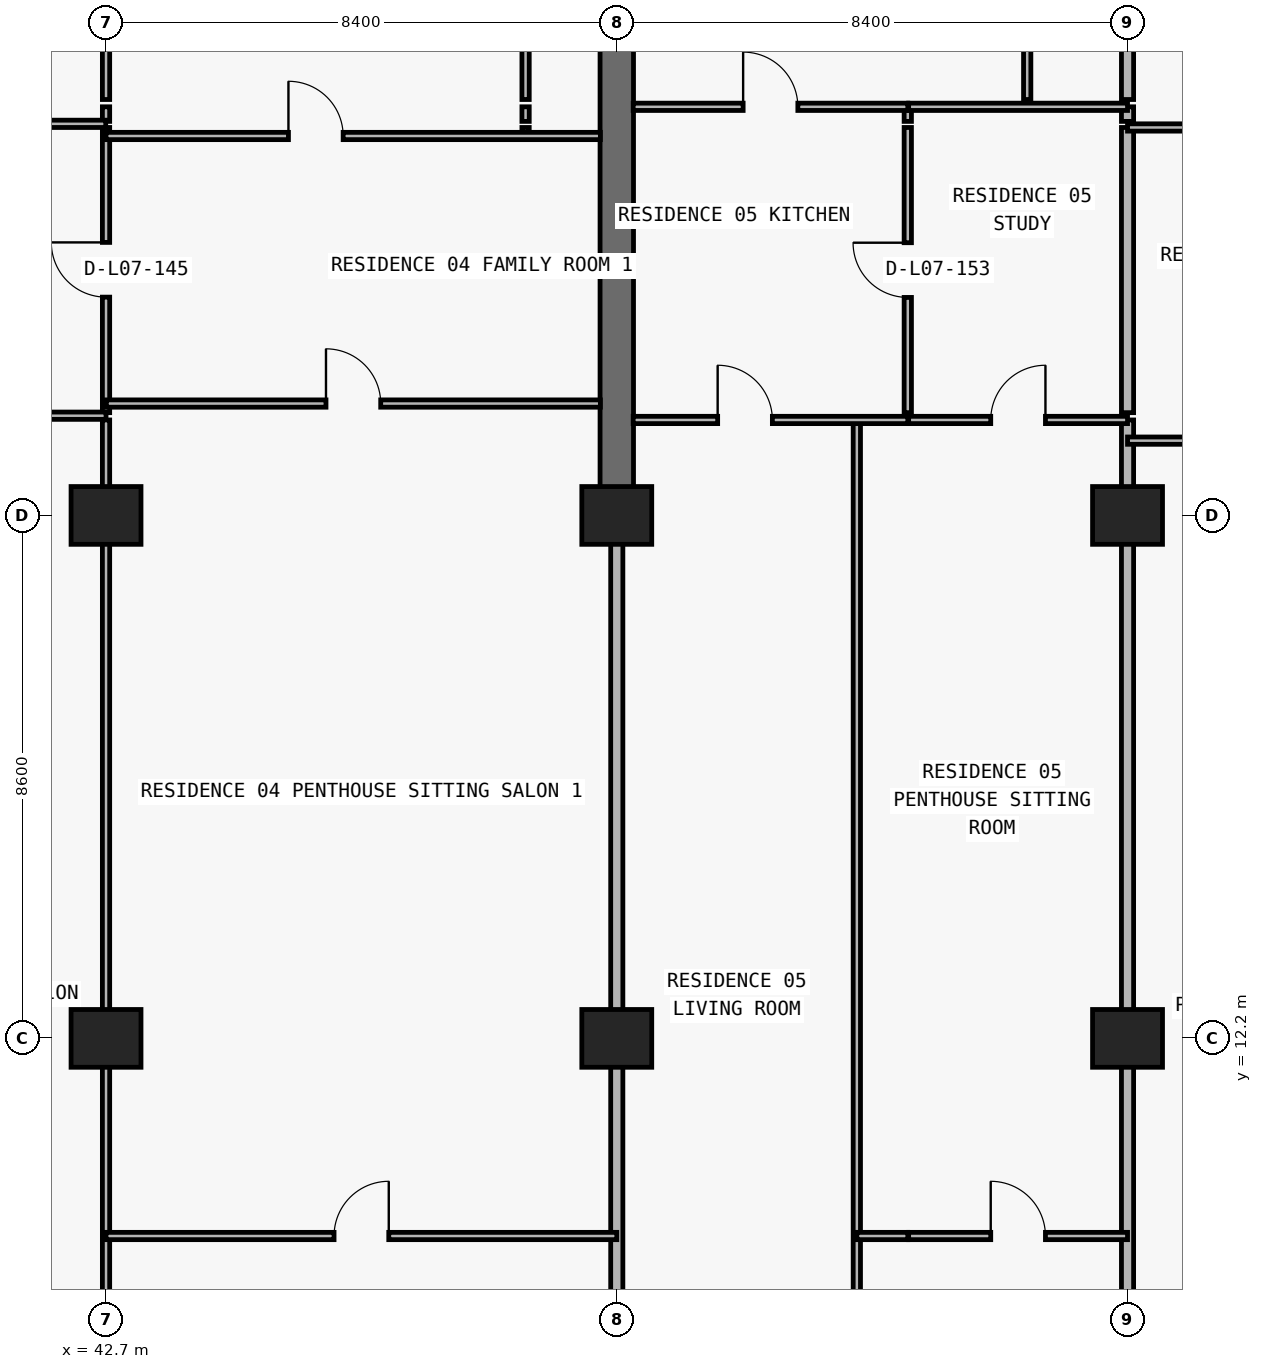
"""IFC4 building model, lengths in metres.
Left out: names, types, materials, properties, quantities, classifications, styles, units other than length and angle.
Written with IfcOpenShell. Run it as: python <this file> out.ifc"""

import sys

from ifc_helpers import new_model, si_unit, direction, frame, frame_2d, origin, origin_2d, place, context, subcontext, project, spatial, rectangle, extrude, element, fill, save


model = new_model("IFC4")
c1 = context("Model", 3, precision=1e-05, world=origin(), true_north=direction((0.0, 1.0)))
c2 = subcontext(c1, "Body", "Model", "MODEL_VIEW")
j1 = project(units=[si_unit("LENGTHUNIT", "METRE"), si_unit("PLANEANGLEUNIT", "RADIAN")], contexts=[c1])
p1 = place(None, origin())
s1 = spatial("IfcSite", under=j1, at=p1, CompositionType="ELEMENT")
p2 = place(p1, origin())
s2 = spatial("IfcBuilding", under=s1, at=p2, CompositionType="ELEMENT")
p3 = place(p2, frame((0.0, 0.0, 33.3)))
s3 = spatial("IfcBuildingStorey", under=s2, at=p3, CompositionType="ELEMENT", Elevation=33.3)
for number, where, z_axis, x_axis in (
    (1, (42.7, 12.2, 0.0), (0.0, 0.0, 1.0), (1.0, 0.0, 0.0)),
    (2, (51.1, 12.2, 0.0), (0.0, 0.0, 1.0), (1.0, 0.0, 0.0)),
    (3, (59.5, 12.2, 0.0), (0.0, 0.0, 1.0), (1.0, 0.0, 0.0)),
    (4, (42.7, 20.8, 0.0), (0.0, 0.0, 1.0), (1.0, 0.0, 0.0)),
    (5, (51.1, 20.8, 0.0), (0.0, 0.0, 1.0), (1.0, 0.0, 0.0)),
    (6, (59.5, 20.8, 0.0), (0.0, 0.0, 1.0), (1.0, 0.0, 0.0)),
):
    element("IfcColumn", number, at=place(p3, frame(where, z_axis=z_axis, x_axis=x_axis)), inside=s3, PredefinedType="COLUMN", context=c2, shape_type="SweptSolid", body=[
        extrude(rectangle(XDim=1.15, YDim=0.95, at=origin_2d()), origin(), (0.0, 0.0, 1.0), 3.05),
    ])
p4 = place(p3, frame((51.1, 20.8, 0.0), z_axis=(0.0, 0.0, 1.0), x_axis=(0.0, 1.0, 0.0)))
e7 = element("IfcWall", 7, at=p4, inside=s3, PredefinedType="SHEAR", context=c2, shape_type="SweptSolid", body=[
    extrude(rectangle(XDim=8.6, YDim=0.55, at=frame_2d((4.3, 0.0))), origin(), (0.0, 0.0, 1.0), 3.05),
])
p5 = place(p3, frame((42.7, 6.24, 0.0), z_axis=(0.0, 0.0, 1.0), x_axis=(0.0, 1.0, 0.0)))
e8 = element("IfcWall", 8, at=p5, inside=s3, PredefinedType="PARTITIONING", context=c2, shape_type="SweptSolid", body=[
    extrude(rectangle(XDim=16.13, YDim=0.12, at=frame_2d((8.065, 0.0))), origin(), (0.0, 0.0, 1.0), 2.11),
])
p6 = place(p3, frame((42.7, 22.49, 0.0), z_axis=(0.0, 0.0, 1.0), x_axis=(0.0, 1.0, 0.0)))
e9 = element("IfcWall", 9, at=p6, inside=s3, PredefinedType="PARTITIONING", context=c2, shape_type="SweptSolid", body=[
    extrude(rectangle(XDim=4.69, YDim=0.12, at=frame_2d((2.345, 0.0))), origin(), (0.0, 0.0, 1.0), 2.11),
])
p7 = place(p6, frame((1.9, 0.0, 0.0)))
e10 = element("IfcOpeningElement", 10, at=p7, cuts=e9, PredefinedType="OPENING", context=c2, shape_type="SweptSolid", body=[
    extrude(rectangle(XDim=0.9, YDim=2.06, at=frame_2d((0.45, 1.03))), frame((0.0, 0.07, 0.0), z_axis=(0.0, -1.0, 0.0), x_axis=(1.0, 0.0, 0.0)), (0.0, 0.0, 1.0), 0.14),
])
p8 = place(p3, frame((42.7, 27.28, 0.0), z_axis=(0.0, 0.0, 1.0), x_axis=(0.0, 1.0, 0.0)))
e11 = element("IfcWall", 11, at=p8, inside=s3, PredefinedType="PARTITIONING", context=c2, shape_type="SweptSolid", body=[
    extrude(rectangle(XDim=0.24, YDim=0.12, at=frame_2d((0.12, 0.0))), origin(), (0.0, 0.0, 1.0), 2.11),
])
p9 = place(p3, frame((42.7, 27.64, 0.0), z_axis=(0.0, 0.0, 1.0), x_axis=(0.0, 1.0, 0.0)))
e12 = element("IfcWall", 12, at=p9, inside=s3, PredefinedType="PARTITIONING", context=c2, shape_type="SweptSolid", body=[
    extrude(rectangle(XDim=6.86, YDim=0.12, at=frame_2d((3.43, 0.0))), origin(), (0.0, 0.0, 1.0), 2.11),
])
p10 = place(p3, frame((49.6, 27.04, 0.0), z_axis=(0.0, 0.0, 1.0), x_axis=(0.0, 1.0, 0.0)))
e13 = element("IfcWall", 13, at=p10, inside=s3, PredefinedType="PARTITIONING", context=c2, shape_type="SweptSolid", body=[
    extrude(rectangle(XDim=0.14, YDim=0.12, at=frame_2d((0.07, 0.0))), origin(), (0.0, 0.0, 1.0), 3.05),
])
p11 = place(p3, frame((49.6, 27.28, 0.0), z_axis=(0.0, 0.0, 1.0), x_axis=(0.0, 1.0, 0.0)))
e14 = element("IfcWall", 14, at=p11, inside=s3, PredefinedType="PARTITIONING", context=c2, shape_type="SweptSolid", body=[
    extrude(rectangle(XDim=0.24, YDim=0.12, at=frame_2d((0.12, 0.0))), origin(), (0.0, 0.0, 1.0), 3.05),
])
p12 = place(p3, frame((49.6, 27.64, 0.0), z_axis=(0.0, 0.0, 1.0), x_axis=(0.0, 1.0, 0.0)))
e15 = element("IfcWall", 15, at=p12, inside=s3, PredefinedType="PARTITIONING", context=c2, shape_type="SweptSolid", body=[
    extrude(rectangle(XDim=6.86, YDim=0.12, at=frame_2d((3.43, 0.0))), origin(), (0.0, 0.0, 1.0), 3.05),
])
p13 = place(p12, frame((3.005, 0.0, 0.0)))
e16 = element("IfcOpeningElement", 16, at=p13, cuts=e15, PredefinedType="OPENING", context=c2, shape_type="SweptSolid", body=[
    extrude(rectangle(XDim=0.85, YDim=2.1, at=frame_2d((0.425, 1.05))), frame((0.0, 0.07, 0.0), z_axis=(0.0, -1.0, 0.0), x_axis=(1.0, 0.0, 0.0)), (0.0, 0.0, 1.0), 0.14),
])
p14 = place(p3, frame((51.1, 6.24, 0.0), z_axis=(0.0, 0.0, 1.0), x_axis=(0.0, 1.0, 0.0)))
e17 = element("IfcWall", 17, at=p14, inside=s3, PredefinedType="PARTITIONING", context=c2, shape_type="SweptSolid", body=[
    extrude(rectangle(XDim=14.555, YDim=0.2, at=frame_2d((7.277, 0.0))), origin(), (0.0, 0.0, 1.0), 2.11),
])
p15 = place(p3, frame((55.048, 6.24, 0.0), z_axis=(0.0, 0.0, 1.0), x_axis=(0.0, 1.0, 0.0)))
e18 = element("IfcWall", 18, at=p15, inside=s3, PredefinedType="PARTITIONING", context=c2, shape_type="SweptSolid", body=[
    extrude(rectangle(XDim=16.13, YDim=0.12, at=frame_2d((8.065, 0.0))), origin(), (0.0, 0.0, 1.0), 3.05),
])
p16 = place(p3, frame((55.886, 22.49, 0.0), z_axis=(0.0, 0.0, 1.0), x_axis=(0.0, 1.0, 0.0)))
e19 = element("IfcWall", 19, at=p16, inside=s3, PredefinedType="PARTITIONING", context=c2, shape_type="SweptSolid", body=[
    extrude(rectangle(XDim=4.69, YDim=0.12, at=frame_2d((2.345, 0.0))), origin(), (0.0, 0.0, 1.0), 3.05),
])
p17 = place(p16, frame((1.895, 0.0, 0.0)))
e20 = element("IfcOpeningElement", 20, at=p17, cuts=e19, PredefinedType="OPENING", context=c2, shape_type="SweptSolid", body=[
    extrude(rectangle(XDim=0.9, YDim=2.15, at=frame_2d((0.45, 1.075))), frame((0.0, 0.07, 0.0), z_axis=(0.0, -1.0, 0.0), x_axis=(1.0, 0.0, 0.0)), (0.0, 0.0, 1.0), 0.14),
])
p18 = place(p3, frame((55.886, 27.28, 0.0), z_axis=(0.0, 0.0, 1.0), x_axis=(0.0, 1.0, 0.0)))
e21 = element("IfcWall", 21, at=p18, inside=s3, PredefinedType="PARTITIONING", context=c2, shape_type="SweptSolid", body=[
    extrude(rectangle(XDim=0.24, YDim=0.12, at=frame_2d((0.12, 0.0))), origin(), (0.0, 0.0, 1.0), 3.05),
])
p19 = place(p3, frame((57.85, 27.64, 0.0), z_axis=(0.0, 0.0, 1.0), x_axis=(0.0, 1.0, 0.0)))
e22 = element("IfcWall", 22, at=p19, inside=s3, PredefinedType="PARTITIONING", context=c2, shape_type="SweptSolid", body=[
    extrude(rectangle(XDim=6.86, YDim=0.12, at=frame_2d((3.43, 0.0))), origin(), (0.0, 0.0, 1.0), 3.05),
])
p20 = place(p19, frame((3.005, 0.0, 0.0)))
e23 = element("IfcOpeningElement", 23, at=p20, cuts=e22, PredefinedType="OPENING", context=c2, shape_type="SweptSolid", body=[
    extrude(rectangle(XDim=0.85, YDim=2.1, at=frame_2d((0.425, 1.05))), frame((0.0, 0.07, 0.0), z_axis=(0.0, -1.0, 0.0), x_axis=(1.0, 0.0, 0.0)), (0.0, 0.0, 1.0), 0.14),
])
p21 = place(p3, frame((59.5, 6.24, 0.0), z_axis=(0.0, 0.0, 1.0), x_axis=(0.0, 1.0, 0.0)))
e24 = element("IfcWall", 24, at=p21, inside=s3, PredefinedType="PARTITIONING", context=c2, shape_type="SweptSolid", body=[
    extrude(rectangle(XDim=16.13, YDim=0.2, at=frame_2d((8.065, 0.0))), origin(), (0.0, 0.0, 1.0), 2.11),
])
p22 = place(p3, frame((59.5, 22.49, 0.0), z_axis=(0.0, 0.0, 1.0), x_axis=(0.0, 1.0, 0.0)))
e25 = element("IfcWall", 25, at=p22, inside=s3, PredefinedType="PARTITIONING", context=c2, shape_type="SweptSolid", body=[
    extrude(rectangle(XDim=4.69, YDim=0.2, at=frame_2d((2.345, 0.0))), origin(), (0.0, 0.0, 1.0), 2.11),
])
p23 = place(p3, frame((59.5, 27.28, 0.0), z_axis=(0.0, 0.0, 1.0), x_axis=(0.0, 1.0, 0.0)))
e26 = element("IfcWall", 26, at=p23, inside=s3, PredefinedType="PARTITIONING", context=c2, shape_type="SweptSolid", body=[
    extrude(rectangle(XDim=0.24, YDim=0.2, at=frame_2d((0.12, 0.0))), origin(), (0.0, 0.0, 1.0), 2.11),
])
p24 = place(p3, frame((59.5, 27.64, 0.0), z_axis=(0.0, 0.0, 1.0), x_axis=(0.0, 1.0, 0.0)))
e27 = element("IfcWall", 27, at=p24, inside=s3, PredefinedType="PARTITIONING", context=c2, shape_type="SweptSolid", body=[
    extrude(rectangle(XDim=6.86, YDim=0.2, at=frame_2d((3.43, 0.0))), origin(), (0.0, 0.0, 1.0), 2.11),
])
p25 = place(p3, frame((42.7, 8.95, 0.0), z_axis=(0.0, 0.0, 1.0), x_axis=(1.0, 0.0, 0.0)))
e28 = element("IfcWall", 28, at=p25, inside=s3, PredefinedType="PARTITIONING", context=c2, shape_type="SweptSolid", body=[
    extrude(rectangle(XDim=8.4, YDim=0.12, at=frame_2d((4.2, 0.0))), origin(), (0.0, 0.0, 1.0), 3.05),
])
p26 = place(p25, frame((3.75, 0.0, 0.0)))
e29 = element("IfcOpeningElement", 29, at=p26, cuts=e28, PredefinedType="OPENING", context=c2, shape_type="SweptSolid", body=[
    extrude(rectangle(XDim=0.9, YDim=2.15, at=frame_2d((0.45, 1.075))), frame((0.0, 0.07, 0.0), z_axis=(0.0, -1.0, 0.0), x_axis=(1.0, 0.0, 0.0)), (0.0, 0.0, 1.0), 0.14),
])
p27 = place(p3, frame((55.048, 8.95, 0.0), z_axis=(0.0, 0.0, 1.0), x_axis=(1.0, 0.0, 0.0)))
e30 = element("IfcWall", 30, at=p27, inside=s3, PredefinedType="PARTITIONING", context=c2, shape_type="SweptSolid", body=[
    extrude(rectangle(XDim=0.838, YDim=0.12, at=frame_2d((0.419, 0.0))), origin(), (0.0, 0.0, 1.0), 3.05),
])
p28 = place(p3, frame((55.9, 8.95, 0.0), z_axis=(0.0, 0.0, 1.0), x_axis=(1.0, 0.0, 0.0)))
e31 = element("IfcWall", 31, at=p28, inside=s3, PredefinedType="PARTITIONING", context=c2, shape_type="SweptSolid", body=[
    extrude(rectangle(XDim=3.6, YDim=0.12, at=frame_2d((1.8, 0.0))), origin(), (0.0, 0.0, 1.0), 3.05),
])
p29 = place(p28, frame((1.35, 0.0, 0.0)))
e32 = element("IfcOpeningElement", 32, at=p29, cuts=e31, PredefinedType="OPENING", context=c2, shape_type="SweptSolid", body=[
    extrude(rectangle(XDim=0.9, YDim=2.15, at=frame_2d((0.45, 1.075))), frame((0.0, 0.07, 0.0), z_axis=(0.0, -1.0, 0.0), x_axis=(1.0, 0.0, 0.0)), (0.0, 0.0, 1.0), 0.14),
])
p30 = place(p3, frame((59.5, 22.03, 0.0), z_axis=(0.0, 0.0, 1.0), x_axis=(1.0, 0.0, 0.0)))
e33 = element("IfcWall", 33, at=p30, inside=s3, PredefinedType="PARTITIONING", context=c2, shape_type="SweptSolid", body=[
    extrude(rectangle(XDim=8.4, YDim=0.12, at=frame_2d((4.2, 0.0))), origin(), (0.0, 0.0, 1.0), 3.05),
])
p31 = place(p30, frame((1.693, 0.0, 0.0)))
e34 = element("IfcOpeningElement", 34, at=p31, cuts=e33, PredefinedType="OPENING", context=c2, shape_type="SweptSolid", body=[
    extrude(rectangle(XDim=0.9, YDim=2.15, at=frame_2d((0.45, 1.075))), frame((0.0, 0.07, 0.0), z_axis=(0.0, -1.0, 0.0), x_axis=(1.0, 0.0, 0.0)), (0.0, 0.0, 1.0), 0.14),
])
p32 = place(p30, frame((6.06, 0.0, 0.0)))
e35 = element("IfcOpeningElement", 35, at=p32, cuts=e33, PredefinedType="OPENING", context=c2, shape_type="SweptSolid", body=[
    extrude(rectangle(XDim=0.9, YDim=2.15, at=frame_2d((0.45, 1.075))), frame((0.0, 0.07, 0.0), z_axis=(0.0, -1.0, 0.0), x_axis=(1.0, 0.0, 0.0)), (0.0, 0.0, 1.0), 0.14),
])
p33 = place(p3, frame((51.37, 22.37, 0.0), z_axis=(0.0, 0.0, 1.0), x_axis=(1.0, 0.0, 0.0)))
e36 = element("IfcWall", 36, at=p33, inside=s3, PredefinedType="PARTITIONING", context=c2, shape_type="SweptSolid", body=[
    extrude(rectangle(XDim=4.516, YDim=0.12, at=frame_2d((2.258, 0.0))), origin(), (0.0, 0.0, 1.0), 3.05),
])
p34 = place(p33, frame((1.389, 0.0, 0.0)))
e37 = element("IfcOpeningElement", 37, at=p34, cuts=e36, PredefinedType="OPENING", context=c2, shape_type="SweptSolid", body=[
    extrude(rectangle(XDim=0.9, YDim=2.15, at=frame_2d((0.45, 1.075))), frame((0.0, 0.07, 0.0), z_axis=(0.0, -1.0, 0.0), x_axis=(1.0, 0.0, 0.0)), (0.0, 0.0, 1.0), 0.14),
])
p35 = place(p3, frame((55.9, 22.37, 0.0), z_axis=(0.0, 0.0, 1.0), x_axis=(1.0, 0.0, 0.0)))
e38 = element("IfcWall", 38, at=p35, inside=s3, PredefinedType="PARTITIONING", context=c2, shape_type="SweptSolid", body=[
    extrude(rectangle(XDim=3.6, YDim=0.12, at=frame_2d((1.8, 0.0))), origin(), (0.0, 0.0, 1.0), 3.05),
])
p36 = place(p35, frame((1.35, 0.0, 0.0)))
e39 = element("IfcOpeningElement", 39, at=p36, cuts=e38, PredefinedType="OPENING", context=c2, shape_type="SweptSolid", body=[
    extrude(rectangle(XDim=0.9, YDim=2.15, at=frame_2d((0.45, 1.075))), frame((0.0, 0.07, 0.0), z_axis=(0.0, -1.0, 0.0), x_axis=(1.0, 0.0, 0.0)), (0.0, 0.0, 1.0), 0.14),
])
p37 = place(p3, frame((35.1, 22.44, 0.0), z_axis=(0.0, 0.0, 1.0), x_axis=(1.0, 0.0, 0.0)))
e40 = element("IfcWall", 40, at=p37, inside=s3, PredefinedType="PARTITIONING", context=c2, shape_type="SweptSolid", body=[
    extrude(rectangle(XDim=7.6, YDim=0.12, at=frame_2d((3.8, 0.0))), origin(), (0.0, 0.0, 1.0), 3.05),
])
p38 = place(p37, frame((3.35, 0.0, 0.0)))
e41 = element("IfcOpeningElement", 41, at=p38, cuts=e40, PredefinedType="OPENING", context=c2, shape_type="SweptSolid", body=[
    extrude(rectangle(XDim=0.9, YDim=2.15, at=frame_2d((0.45, 1.075))), frame((0.0, 0.07, 0.0), z_axis=(0.0, -1.0, 0.0), x_axis=(1.0, 0.0, 0.0)), (0.0, 0.0, 1.0), 0.14),
])
p39 = place(p3, frame((42.705, 22.64, 0.0), z_axis=(0.0, 0.0, 1.0), x_axis=(1.0, 0.0, 0.0)))
e42 = element("IfcWall", 42, at=p39, inside=s3, PredefinedType="PARTITIONING", context=c2, shape_type="SweptSolid", body=[
    extrude(rectangle(XDim=8.125, YDim=0.12, at=frame_2d((4.062, 0.0))), origin(), (0.0, 0.0, 1.0), 3.05),
])
p40 = place(p39, frame((3.613, 0.0, 0.0)))
e43 = element("IfcOpeningElement", 43, at=p40, cuts=e42, PredefinedType="OPENING", context=c2, shape_type="SweptSolid", body=[
    extrude(rectangle(XDim=0.9, YDim=2.15, at=frame_2d((0.45, 1.075))), frame((0.0, 0.07, 0.0), z_axis=(0.0, -1.0, 0.0), x_axis=(1.0, 0.0, 0.0)), (0.0, 0.0, 1.0), 0.14),
])
p41 = place(p3, frame((42.7, 27.04, 0.0), z_axis=(0.0, 0.0, 1.0), x_axis=(1.0, 0.0, 0.0)))
e44 = element("IfcWall", 44, at=p41, inside=s3, PredefinedType="PARTITIONING", context=c2, shape_type="SweptSolid", body=[
    extrude(rectangle(XDim=8.13, YDim=0.12, at=frame_2d((4.065, 0.0))), origin(), (0.0, 0.0, 1.0), 3.05),
])
p42 = place(p41, frame((3.0, 0.0, 0.0)))
e45 = element("IfcOpeningElement", 45, at=p42, cuts=e44, PredefinedType="OPENING", context=c2, shape_type="SweptSolid", body=[
    extrude(rectangle(XDim=0.9, YDim=2.15, at=frame_2d((0.45, 1.075))), frame((0.0, 0.07, 0.0), z_axis=(0.0, -1.0, 0.0), x_axis=(1.0, 0.0, 0.0)), (0.0, 0.0, 1.0), 0.14),
])
p43 = place(p3, frame((59.5, 27.18, 0.0), z_axis=(0.0, 0.0, 1.0), x_axis=(1.0, 0.0, 0.0)))
e46 = element("IfcWall", 46, at=p43, inside=s3, PredefinedType="PARTITIONING", context=c2, shape_type="SweptSolid", body=[
    extrude(rectangle(XDim=8.4, YDim=0.12, at=frame_2d((4.2, 0.0))), origin(), (0.0, 0.0, 1.0), 3.05),
])
p44 = place(p43, frame((1.693, 0.0, 0.0)))
e47 = element("IfcOpeningElement", 47, at=p44, cuts=e46, PredefinedType="OPENING", context=c2, shape_type="SweptSolid", body=[
    extrude(rectangle(XDim=0.9, YDim=2.15, at=frame_2d((0.45, 1.075))), frame((0.0, 0.07, 0.0), z_axis=(0.0, -1.0, 0.0), x_axis=(1.0, 0.0, 0.0)), (0.0, 0.0, 1.0), 0.14),
])
p45 = place(p3, frame((35.1, 27.24, 0.0), z_axis=(0.0, 0.0, 1.0), x_axis=(1.0, 0.0, 0.0)))
e48 = element("IfcWall", 48, at=p45, inside=s3, PredefinedType="PARTITIONING", context=c2, shape_type="SweptSolid", body=[
    extrude(rectangle(XDim=7.595, YDim=0.12, at=frame_2d((3.797, 0.0))), origin(), (0.0, 0.0, 1.0), 3.05),
])
p46 = place(p45, frame((2.6, 0.0, 0.0)))
e49 = element("IfcOpeningElement", 49, at=p46, cuts=e48, PredefinedType="OPENING", context=c2, shape_type="SweptSolid", body=[
    extrude(rectangle(XDim=0.9, YDim=2.15, at=frame_2d((0.45, 1.075))), frame((0.0, 0.07, 0.0), z_axis=(0.0, -1.0, 0.0), x_axis=(1.0, 0.0, 0.0)), (0.0, 0.0, 1.0), 0.14),
])
p47 = place(p3, frame((51.37, 27.52, 0.0), z_axis=(0.0, 0.0, 1.0), x_axis=(1.0, 0.0, 0.0)))
e50 = element("IfcWall", 50, at=p47, inside=s3, PredefinedType="PARTITIONING", context=c2, shape_type="SweptSolid", body=[
    extrude(rectangle(XDim=4.516, YDim=0.12, at=frame_2d((2.258, 0.0))), origin(), (0.0, 0.0, 1.0), 3.05),
])
p48 = place(p47, frame((1.808, 0.0, 0.0)))
e51 = element("IfcOpeningElement", 51, at=p48, cuts=e50, PredefinedType="OPENING", context=c2, shape_type="SweptSolid", body=[
    extrude(rectangle(XDim=0.9, YDim=2.15, at=frame_2d((0.45, 1.075))), frame((0.0, 0.07, 0.0), z_axis=(0.0, -1.0, 0.0), x_axis=(1.0, 0.0, 0.0)), (0.0, 0.0, 1.0), 0.14),
])
p49 = place(p3, frame((55.9, 27.52, 0.0), z_axis=(0.0, 0.0, 1.0), x_axis=(1.0, 0.0, 0.0)))
e52 = element("IfcWall", 52, at=p49, inside=s3, PredefinedType="PARTITIONING", context=c2, shape_type="SweptSolid", body=[
    extrude(rectangle(XDim=3.6, YDim=0.12, at=frame_2d((1.8, 0.0))), origin(), (0.0, 0.0, 1.0), 3.05),
])
p50 = place(p7, origin())
e53 = element("IfcDoor", 53, at=p50, inside=s3, OperationType="SINGLE_SWING_RIGHT", PredefinedType="DOOR", context=c2, shape_type="SweptSolid", body=[
    extrude(rectangle(XDim=0.9, YDim=2.06, at=frame_2d((0.45, 1.03))), frame((0.0, 0.025, 0.0), z_axis=(0.0, -1.0, 0.0), x_axis=(1.0, 0.0, 0.0)), (0.0, 0.0, 1.0), 0.05),
])
fill(e10, e53)
p51 = place(p42, origin())
e54 = element("IfcDoor", 54, at=p51, inside=s3, OperationType="SINGLE_SWING_LEFT", PredefinedType="DOOR", context=c2, shape_type="SweptSolid", body=[
    extrude(rectangle(XDim=0.9, YDim=2.15, at=frame_2d((0.45, 1.075))), frame((0.0, 0.025, 0.0), z_axis=(0.0, -1.0, 0.0), x_axis=(1.0, 0.0, 0.0)), (0.0, 0.0, 1.0), 0.05),
])
fill(e45, e54)
p52 = place(p40, origin())
e55 = element("IfcDoor", 55, at=p52, inside=s3, OperationType="SINGLE_SWING_LEFT", PredefinedType="DOOR", context=c2, shape_type="SweptSolid", body=[
    extrude(rectangle(XDim=0.9, YDim=2.15, at=frame_2d((0.45, 1.075))), frame((0.0, 0.025, 0.0), z_axis=(0.0, -1.0, 0.0), x_axis=(1.0, 0.0, 0.0)), (0.0, 0.0, 1.0), 0.05),
])
fill(e43, e55)
p53 = place(p26, origin())
e56 = element("IfcDoor", 56, at=p53, inside=s3, OperationType="SINGLE_SWING_RIGHT", PredefinedType="DOOR", context=c2, shape_type="SweptSolid", body=[
    extrude(rectangle(XDim=0.9, YDim=2.15, at=frame_2d((0.45, 1.075))), frame((0.0, 0.025, 0.0), z_axis=(0.0, -1.0, 0.0), x_axis=(1.0, 0.0, 0.0)), (0.0, 0.0, 1.0), 0.05),
])
fill(e29, e56)
p54 = place(p48, origin())
e57 = element("IfcDoor", 57, at=p54, inside=s3, OperationType="SINGLE_SWING_LEFT", PredefinedType="DOOR", context=c2, shape_type="SweptSolid", body=[
    extrude(rectangle(XDim=0.9, YDim=2.15, at=frame_2d((0.45, 1.075))), frame((0.0, 0.025, 0.0), z_axis=(0.0, -1.0, 0.0), x_axis=(1.0, 0.0, 0.0)), (0.0, 0.0, 1.0), 0.05),
])
fill(e51, e57)
p55 = place(p17, origin())
e58 = element("IfcDoor", 58, at=p55, inside=s3, OperationType="SINGLE_SWING_RIGHT", PredefinedType="DOOR", context=c2, shape_type="SweptSolid", body=[
    extrude(rectangle(XDim=0.9, YDim=2.15, at=frame_2d((0.45, 1.075))), frame((0.0, 0.025, 0.0), z_axis=(0.0, -1.0, 0.0), x_axis=(1.0, 0.0, 0.0)), (0.0, 0.0, 1.0), 0.05),
])
fill(e20, e58)
p56 = place(p34, origin())
e59 = element("IfcDoor", 59, at=p56, inside=s3, OperationType="SINGLE_SWING_LEFT", PredefinedType="DOOR", context=c2, shape_type="SweptSolid", body=[
    extrude(rectangle(XDim=0.9, YDim=2.15, at=frame_2d((0.45, 1.075))), frame((0.0, 0.025, 0.0), z_axis=(0.0, -1.0, 0.0), x_axis=(1.0, 0.0, 0.0)), (0.0, 0.0, 1.0), 0.05),
])
fill(e37, e59)
p57 = place(p36, origin())
e60 = element("IfcDoor", 60, at=p57, inside=s3, OperationType="SINGLE_SWING_RIGHT", PredefinedType="DOOR", context=c2, shape_type="SweptSolid", body=[
    extrude(rectangle(XDim=0.9, YDim=2.15, at=frame_2d((0.45, 1.075))), frame((0.0, 0.025, 0.0), z_axis=(0.0, -1.0, 0.0), x_axis=(1.0, 0.0, 0.0)), (0.0, 0.0, 1.0), 0.05),
])
fill(e39, e60)
p58 = place(p29, origin())
e61 = element("IfcDoor", 61, at=p58, inside=s3, OperationType="SINGLE_SWING_LEFT", PredefinedType="DOOR", context=c2, shape_type="SweptSolid", body=[
    extrude(rectangle(XDim=0.9, YDim=2.15, at=frame_2d((0.45, 1.075))), frame((0.0, 0.025, 0.0), z_axis=(0.0, -1.0, 0.0), x_axis=(1.0, 0.0, 0.0)), (0.0, 0.0, 1.0), 0.05),
])
fill(e32, e61)
save(model, sys.argv[1])
